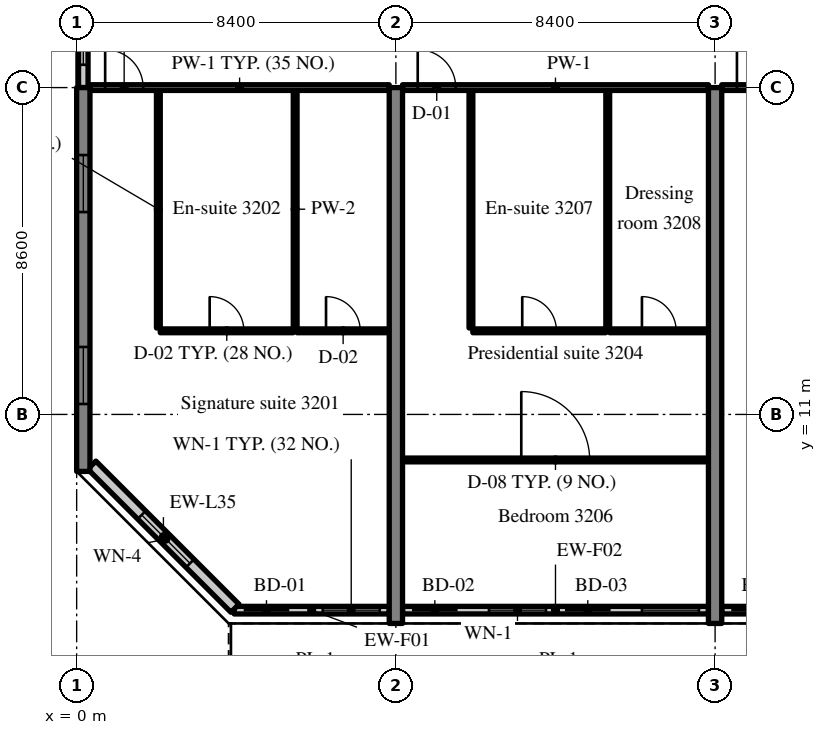
"""IFC4 building model, lengths in metres.
Left out: names, types, materials, properties, quantities, classifications, styles, units other than length and angle.
Written with IfcOpenShell. Run it as: python <this file> out.ifc"""

import sys

from ifc_helpers import new_model, si_unit, direction, frame, frame_2d, origin, place, context, subcontext, project, spatial, rectangle, extrude, source, transform, mapped, element, fill, save


model = new_model("IFC4")
c1 = context("Model", 3, precision=1e-05, world=origin(), true_north=direction((0.0, 1.0)))
c2 = subcontext(c1, "Body", "Model", "MODEL_VIEW")
j1 = project(units=[si_unit("LENGTHUNIT", "METRE"), si_unit("PLANEANGLEUNIT", "RADIAN")], contexts=[c1])
p1 = place(None, origin())
s1 = spatial("IfcSite", under=j1, at=p1, CompositionType="ELEMENT")
p2 = place(p1, origin())
s2 = spatial("IfcBuilding", under=s1, at=p2, CompositionType="ELEMENT")
p3 = place(p2, frame((0.0, 0.0, 133.2)))
s3 = spatial("IfcBuildingStorey", under=s2, at=p3, CompositionType="ELEMENT", Elevation=133.2)
m1 = source(origin(), c2, "Body", "SweptSolid", [
    extrude(rectangle(XDim=10.1, YDim=0.35, at=frame_2d((5.05, 0.0))), origin(), (0.0, 0.0, 1.0), 3.52),
])
p4 = place(p3, frame((0.175, 9.5, 0.0), z_axis=(0.0, 0.0, 1.0), x_axis=(0.0, 1.0, 0.0)))
e1 = element("IfcWall", 1, at=p4, inside=s3, PredefinedType="SHEAR", context=c2, shape_type="MappedRepresentation", body=[
    mapped(m1, transform((0.0, 0.0, 0.0), scale=1.0)),
])
m2 = source(origin(), c2, "Body", "SweptSolid", [
    extrude(rectangle(XDim=1.5, YDim=1.5, at=frame_2d((0.75, 0.75))), frame((0.0, 0.185, 0.0), z_axis=(0.0, -1.0, 0.0), x_axis=(1.0, 0.0, 0.0)), (0.0, 0.0, 1.0), 0.37),
])
p5 = place(p4, frame((1.775, 0.0, 0.9)))
e2 = element("IfcOpeningElement", 2, at=p5, cuts=e1, PredefinedType="OPENING", context=c2, shape_type="MappedRepresentation", body=[
    mapped(m2, transform((0.0, 0.0, 0.0), scale=1.0)),
])
p6 = place(p4, frame((6.825, 0.0, 0.9)))
e3 = element("IfcOpeningElement", 3, at=p6, cuts=e1, PredefinedType="OPENING", context=c2, shape_type="MappedRepresentation", body=[
    mapped(m2, transform((0.0, 0.0, 0.0), scale=1.0)),
])
m3 = source(origin(), c2, "Body", "SweptSolid", [
    extrude(rectangle(XDim=14.1, YDim=0.35, at=frame_2d((7.05, 0.0))), origin(), (0.0, 0.0, 1.0), 3.52),
])
for number, where, z_axis, x_axis in (
    (4, (8.4, 5.5, 0.0), (0.0, 0.0, 1.0), (0.0, 1.0, 0.0)),
    (5, (16.8, 5.5, 0.0), (0.0, 0.0, 1.0), (0.0, 1.0, 0.0)),
):
    element("IfcWall", number, at=place(p3, frame(where, z_axis=z_axis, x_axis=x_axis)), inside=s3, PredefinedType="SHEAR", context=c2, shape_type="MappedRepresentation", body=[
        mapped(m3, transform((0.0, 0.0, 0.0), scale=1.0)),
    ])
m4 = source(origin(), c2, "Body", "SweptSolid", [
    extrude(rectangle(XDim=4.08, YDim=0.2, at=frame_2d((2.04, 0.0))), origin(), (0.0, 0.0, 1.0), 2.82),
])
p7 = place(p3, frame((4.145, 5.85, 0.0), z_axis=(0.0, 0.0, 1.0), x_axis=(1.0, 0.0, 0.0)))
e6 = element("IfcWall", 6, at=p7, inside=s3, PredefinedType="SOLIDWALL", context=c2, shape_type="MappedRepresentation", body=[
    mapped(m4, transform((0.0, 0.0, 0.0), scale=1.0)),
])
m5 = source(origin(), c2, "Body", "SweptSolid", [
    extrude(rectangle(XDim=1.2, YDim=2.4, at=frame_2d((0.6, 1.2))), frame((0.0, 0.11, 0.0), z_axis=(0.0, -1.0, 0.0), x_axis=(1.0, 0.0, 0.0)), (0.0, 0.0, 1.0), 0.22),
])
p8 = place(p7, frame((0.25, 0.0, 0.0)))
e7 = element("IfcOpeningElement", 7, at=p8, cuts=e6, PredefinedType="OPENING", context=c2, shape_type="MappedRepresentation", body=[
    mapped(m5, transform((0.0, 0.0, 0.0), scale=1.0)),
])
m6 = source(origin(), c2, "Body", "SweptSolid", [
    extrude(rectangle(XDim=1.5, YDim=1.5, at=frame_2d((0.75, 0.75))), frame((0.0, 0.11, 0.0), z_axis=(0.0, -1.0, 0.0), x_axis=(1.0, 0.0, 0.0)), (0.0, 0.0, 1.0), 0.22),
])
p9 = place(p7, frame((2.33, 0.0, 0.9)))
e8 = element("IfcOpeningElement", 8, at=p9, cuts=e6, PredefinedType="OPENING", context=c2, shape_type="MappedRepresentation", body=[
    mapped(m6, transform((0.0, 0.0, 0.0), scale=1.0)),
])
m7 = source(origin(), c2, "Body", "SweptSolid", [
    extrude(rectangle(XDim=8.05, YDim=0.2, at=frame_2d((4.025, 0.0))), origin(), (0.0, 0.0, 1.0), 2.82),
])
p10 = place(p3, frame((8.575, 5.85, 0.0), z_axis=(0.0, 0.0, 1.0), x_axis=(1.0, 0.0, 0.0)))
e9 = element("IfcWall", 9, at=p10, inside=s3, PredefinedType="SOLIDWALL", context=c2, shape_type="MappedRepresentation", body=[
    mapped(m7, transform((0.0, 0.0, 0.0), scale=1.0)),
])
p11 = place(p10, frame((0.25, 0.0, 0.0)))
e10 = element("IfcOpeningElement", 10, at=p11, cuts=e9, PredefinedType="OPENING", context=c2, shape_type="MappedRepresentation", body=[
    mapped(m5, transform((0.0, 0.0, 0.0), scale=1.0)),
])
p12 = place(p10, frame((2.275, 0.0, 0.9)))
e11 = element("IfcOpeningElement", 11, at=p12, cuts=e9, PredefinedType="OPENING", context=c2, shape_type="MappedRepresentation", body=[
    mapped(m6, transform((0.0, 0.0, 0.0), scale=1.0)),
])
p13 = place(p10, frame((4.275, 0.0, 0.0)))
e12 = element("IfcOpeningElement", 12, at=p13, cuts=e9, PredefinedType="OPENING", context=c2, shape_type="MappedRepresentation", body=[
    mapped(m5, transform((0.0, 0.0, 0.0), scale=1.0)),
])
p14 = place(p10, frame((6.3, 0.0, 0.9)))
e13 = element("IfcOpeningElement", 13, at=p14, cuts=e9, PredefinedType="OPENING", context=c2, shape_type="MappedRepresentation", body=[
    mapped(m6, transform((0.0, 0.0, 0.0), scale=1.0)),
])
m8 = source(origin(), c2, "Body", "SweptSolid", [
    extrude(rectangle(XDim=8.05, YDim=0.2, at=frame_2d((4.025, 0.0))), origin(), (0.0, 0.0, 1.0), 2.82),
])
p15 = place(p3, frame((16.975, 5.85, 0.0), z_axis=(0.0, 0.0, 1.0), x_axis=(1.0, 0.0, 0.0)))
e14 = element("IfcWall", 14, at=p15, inside=s3, PredefinedType="SOLIDWALL", context=c2, shape_type="MappedRepresentation", body=[
    mapped(m8, transform((0.0, 0.0, 0.0), scale=1.0)),
])
p16 = place(p15, frame((0.25, 0.0, 0.0)))
e15 = element("IfcOpeningElement", 15, at=p16, cuts=e14, PredefinedType="OPENING", context=c2, shape_type="MappedRepresentation", body=[
    mapped(m5, transform((0.0, 0.0, 0.0), scale=1.0)),
])
p17 = place(p15, frame((2.275, 0.0, 0.9)))
e16 = element("IfcOpeningElement", 16, at=p17, cuts=e14, PredefinedType="OPENING", context=c2, shape_type="MappedRepresentation", body=[
    mapped(m6, transform((0.0, 0.0, 0.0), scale=1.0)),
])
p18 = place(p15, frame((4.275, 0.0, 0.0)))
e17 = element("IfcOpeningElement", 17, at=p18, cuts=e14, PredefinedType="OPENING", context=c2, shape_type="MappedRepresentation", body=[
    mapped(m5, transform((0.0, 0.0, 0.0), scale=1.0)),
])
p19 = place(p15, frame((6.3, 0.0, 0.9)))
e18 = element("IfcOpeningElement", 18, at=p19, cuts=e14, PredefinedType="OPENING", context=c2, shape_type="MappedRepresentation", body=[
    mapped(m6, transform((0.0, 0.0, 0.0), scale=1.0)),
])
m9 = source(origin(), c2, "Body", "SweptSolid", [
    extrude(rectangle(XDim=5.326, YDim=0.3, at=frame_2d((2.663, 0.0))), origin(), (0.0, 0.0, 1.0), 3.52),
])
p20 = place(p3, frame((0.4, 9.666, 0.0), z_axis=(0.0, 0.0, 1.0), x_axis=(0.707106781187, -0.707106781187, 0.0)))
e19 = element("IfcWall", 19, at=p20, inside=s3, PredefinedType="SOLIDWALL", context=c2, shape_type="MappedRepresentation", body=[
    mapped(m9, transform((0.0, 0.0, 0.0), scale=1.0)),
])
m10 = source(origin(), c2, "Body", "SweptSolid", [
    extrude(rectangle(XDim=1.8, YDim=1.5, at=frame_2d((0.9, 0.75))), frame((0.0, 0.16, 0.0), z_axis=(0.0, -1.0, 0.0), x_axis=(1.0, 0.0, 0.0)), (0.0, 0.0, 1.0), 0.32),
])
p21 = place(p20, frame((1.854, 0.0, 0.9)))
e20 = element("IfcOpeningElement", 20, at=p21, cuts=e19, PredefinedType="OPENING", context=c2, shape_type="MappedRepresentation", body=[
    mapped(m10, transform((0.0, 0.0, 0.0), scale=1.0)),
])
m11 = source(origin(), c2, "Body", "SweptSolid", [
    extrude(rectangle(XDim=2.4, YDim=0.25, at=frame_2d((1.2, 0.0))), origin(), (0.0, 0.0, 1.0), 2.62),
])
p22 = place(p3, frame((0.175, 19.6, 0.0), z_axis=(0.0, 0.0, 1.0), x_axis=(0.0, 1.0, 0.0)))
e21 = element("IfcWall", 21, at=p22, inside=s3, PredefinedType="SOLIDWALL", context=c2, shape_type="MappedRepresentation", body=[
    mapped(m11, transform((0.0, 0.0, 0.0), scale=1.0)),
])
m12 = source(origin(), c2, "Body", "SweptSolid", [
    extrude(rectangle(XDim=1.2, YDim=1.5, at=frame_2d((0.6, 0.75))), frame((0.0, 0.135, 0.0), z_axis=(0.0, -1.0, 0.0), x_axis=(1.0, 0.0, 0.0)), (0.0, 0.0, 1.0), 0.27),
])
p23 = place(p22, frame((0.6, 0.0, 0.9)))
e22 = element("IfcOpeningElement", 22, at=p23, cuts=e21, PredefinedType="OPENING", context=c2, shape_type="MappedRepresentation", body=[
    mapped(m12, transform((0.0, 0.0, 0.0), scale=1.0)),
])
m13 = source(origin(), c2, "Body", "SweptSolid", [
    extrude(rectangle(XDim=6.25, YDim=0.1, at=frame_2d((3.125, 0.0))), origin(), (0.0, 0.0, 1.0), 3.52),
])
for number, where, z_axis, x_axis in (
    (23, (2.15, 13.275, 0.0), (0.0, 0.0, 1.0), (0.0, 1.0, 0.0)),
    (24, (5.75, 13.275, 0.0), (0.0, 0.0, 1.0), (0.0, 1.0, 0.0)),
):
    element("IfcWall", number, at=place(p3, frame(where, z_axis=z_axis, x_axis=x_axis)), inside=s3, PredefinedType="PARTITIONING", context=c2, shape_type="MappedRepresentation", body=[
        mapped(m13, transform((0.0, 0.0, 0.0), scale=1.0)),
    ])
m14 = source(origin(), c2, "Body", "SweptSolid", [
    extrude(rectangle(XDim=3.5, YDim=0.1, at=frame_2d((1.75, 0.0))), origin(), (0.0, 0.0, 1.0), 3.52),
])
p24 = place(p3, frame((2.2, 13.2, 0.0), z_axis=(0.0, 0.0, 1.0), x_axis=(1.0, 0.0, 0.0)))
e25 = element("IfcWall", 25, at=p24, inside=s3, PredefinedType="PARTITIONING", context=c2, shape_type="MappedRepresentation", body=[
    mapped(m14, transform((0.0, 0.0, 0.0), scale=1.0)),
])
m15 = source(origin(), c2, "Body", "SweptSolid", [
    extrude(rectangle(XDim=0.9, YDim=2.1, at=frame_2d((0.45, 1.05))), frame((0.0, 0.06, 0.0), z_axis=(0.0, -1.0, 0.0), x_axis=(1.0, 0.0, 0.0)), (0.0, 0.0, 1.0), 0.12),
])
p25 = place(p24, frame((1.3, 0.0, 0.0)))
e26 = element("IfcOpeningElement", 26, at=p25, cuts=e25, PredefinedType="OPENING", context=c2, shape_type="MappedRepresentation", body=[
    mapped(m15, transform((0.0, 0.0, 0.0), scale=1.0)),
])
m16 = source(origin(), c2, "Body", "SweptSolid", [
    extrude(rectangle(XDim=2.425, YDim=0.1, at=frame_2d((1.212, 0.0))), origin(), (0.0, 0.0, 1.0), 3.52),
])
p26 = place(p3, frame((5.8, 13.2, 0.0), z_axis=(0.0, 0.0, 1.0), x_axis=(1.0, 0.0, 0.0)))
e27 = element("IfcWall", 27, at=p26, inside=s3, PredefinedType="PARTITIONING", context=c2, shape_type="MappedRepresentation", body=[
    mapped(m16, transform((0.0, 0.0, 0.0), scale=1.0)),
])
p27 = place(p26, frame((0.762, 0.0, 0.0)))
e28 = element("IfcOpeningElement", 28, at=p27, cuts=e27, PredefinedType="OPENING", context=c2, shape_type="MappedRepresentation", body=[
    mapped(m15, transform((0.0, 0.0, 0.0), scale=1.0)),
])
m17 = source(origin(), c2, "Body", "SweptSolid", [
    extrude(rectangle(XDim=7.875, YDim=0.15, at=frame_2d((3.938, 0.0))), origin(), (0.0, 0.0, 1.0), 2.82),
])
p28 = place(p3, frame((0.35, 19.6, 0.0), z_axis=(0.0, 0.0, 1.0), x_axis=(1.0, 0.0, 0.0)))
e29 = element("IfcWall", 29, at=p28, inside=s3, PredefinedType="PARTITIONING", context=c2, shape_type="MappedRepresentation", body=[
    mapped(m17, transform((0.0, 0.0, 0.0), scale=1.0)),
])
m18 = source(origin(), c2, "Body", "SweptSolid", [
    extrude(rectangle(XDim=1.0, YDim=2.1, at=frame_2d((0.5, 1.05))), frame((0.0, 0.085, 0.0), z_axis=(0.0, -1.0, 0.0), x_axis=(1.0, 0.0, 0.0)), (0.0, 0.0, 1.0), 0.17),
])
p29 = place(p28, frame((0.4, 0.0, 0.0)))
e30 = element("IfcOpeningElement", 30, at=p29, cuts=e29, PredefinedType="OPENING", context=c2, shape_type="MappedRepresentation", body=[
    mapped(m18, transform((0.0, 0.0, 0.0), scale=1.0)),
])
for number, where, z_axis, x_axis in (
    (31, (10.375, 13.275, 0.0), (0.0, 0.0, 1.0), (0.0, 1.0, 0.0)),
    (32, (13.975, 13.275, 0.0), (0.0, 0.0, 1.0), (0.0, 1.0, 0.0)),
):
    element("IfcWall", number, at=place(p3, frame(where, z_axis=z_axis, x_axis=x_axis)), inside=s3, PredefinedType="PARTITIONING", context=c2, shape_type="MappedRepresentation", body=[
        mapped(m13, transform((0.0, 0.0, 0.0), scale=1.0)),
    ])
p30 = place(p3, frame((10.425, 13.2, 0.0), z_axis=(0.0, 0.0, 1.0), x_axis=(1.0, 0.0, 0.0)))
e33 = element("IfcWall", 33, at=p30, inside=s3, PredefinedType="PARTITIONING", context=c2, shape_type="MappedRepresentation", body=[
    mapped(m14, transform((0.0, 0.0, 0.0), scale=1.0)),
])
p31 = place(p30, frame((1.3, 0.0, 0.0)))
e34 = element("IfcOpeningElement", 34, at=p31, cuts=e33, PredefinedType="OPENING", context=c2, shape_type="MappedRepresentation", body=[
    mapped(m15, transform((0.0, 0.0, 0.0), scale=1.0)),
])
m19 = source(origin(), c2, "Body", "SweptSolid", [
    extrude(rectangle(XDim=2.6, YDim=0.1, at=frame_2d((1.3, 0.0))), origin(), (0.0, 0.0, 1.0), 3.52),
])
p32 = place(p3, frame((14.025, 13.2, 0.0), z_axis=(0.0, 0.0, 1.0), x_axis=(1.0, 0.0, 0.0)))
e35 = element("IfcWall", 35, at=p32, inside=s3, PredefinedType="PARTITIONING", context=c2, shape_type="MappedRepresentation", body=[
    mapped(m19, transform((0.0, 0.0, 0.0), scale=1.0)),
])
p33 = place(p32, frame((0.85, 0.0, 0.0)))
e36 = element("IfcOpeningElement", 36, at=p33, cuts=e35, PredefinedType="OPENING", context=c2, shape_type="MappedRepresentation", body=[
    mapped(m15, transform((0.0, 0.0, 0.0), scale=1.0)),
])
m20 = source(origin(), c2, "Body", "SweptSolid", [
    extrude(rectangle(XDim=8.05, YDim=0.1, at=frame_2d((4.025, 0.0))), origin(), (0.0, 0.0, 1.0), 3.52),
])
p34 = place(p3, frame((8.575, 9.802, 0.0), z_axis=(0.0, 0.0, 1.0), x_axis=(1.0, 0.0, 0.0)))
e37 = element("IfcWall", 37, at=p34, inside=s3, PredefinedType="PARTITIONING", context=c2, shape_type="MappedRepresentation", body=[
    mapped(m20, transform((0.0, 0.0, 0.0), scale=1.0)),
])
m21 = source(origin(), c2, "Body", "SweptSolid", [
    extrude(rectangle(XDim=1.8, YDim=2.1, at=frame_2d((0.9, 1.05))), frame((0.0, 0.06, 0.0), z_axis=(0.0, -1.0, 0.0), x_axis=(1.0, 0.0, 0.0)), (0.0, 0.0, 1.0), 0.12),
])
p35 = place(p34, frame((3.125, 0.0, 0.0)))
e38 = element("IfcOpeningElement", 38, at=p35, cuts=e37, PredefinedType="OPENING", context=c2, shape_type="MappedRepresentation", body=[
    mapped(m21, transform((0.0, 0.0, 0.0), scale=1.0)),
])
m22 = source(origin(), c2, "Body", "SweptSolid", [
    extrude(rectangle(XDim=8.05, YDim=0.15, at=frame_2d((4.025, 0.0))), origin(), (0.0, 0.0, 1.0), 2.82),
])
p36 = place(p3, frame((8.575, 19.6, 0.0), z_axis=(0.0, 0.0, 1.0), x_axis=(1.0, 0.0, 0.0)))
e39 = element("IfcWall", 39, at=p36, inside=s3, PredefinedType="PARTITIONING", context=c2, shape_type="MappedRepresentation", body=[
    mapped(m22, transform((0.0, 0.0, 0.0), scale=1.0)),
])
p37 = place(p36, frame((0.4, 0.0, 0.0)))
e40 = element("IfcOpeningElement", 40, at=p37, cuts=e39, PredefinedType="OPENING", context=c2, shape_type="MappedRepresentation", body=[
    mapped(m18, transform((0.0, 0.0, 0.0), scale=1.0)),
])
m23 = source(origin(), c2, "Body", "SweptSolid", [
    extrude(rectangle(XDim=8.05, YDim=0.15, at=frame_2d((4.025, 0.0))), origin(), (0.0, 0.0, 1.0), 2.82),
])
p38 = place(p3, frame((16.975, 19.6, 0.0), z_axis=(0.0, 0.0, 1.0), x_axis=(1.0, 0.0, 0.0)))
e41 = element("IfcWall", 41, at=p38, inside=s3, PredefinedType="PARTITIONING", context=c2, shape_type="MappedRepresentation", body=[
    mapped(m23, transform((0.0, 0.0, 0.0), scale=1.0)),
])
p39 = place(p38, frame((0.4, 0.0, 0.0)))
e42 = element("IfcOpeningElement", 42, at=p39, cuts=e41, PredefinedType="OPENING", context=c2, shape_type="MappedRepresentation", body=[
    mapped(m18, transform((0.0, 0.0, 0.0), scale=1.0)),
])
m24 = source(origin(), c2, "Body", "SweptSolid", [
    extrude(rectangle(XDim=1.2, YDim=2.4, at=frame_2d((0.6, 1.2))), frame((0.0, 0.025, 0.0), z_axis=(0.0, -1.0, 0.0), x_axis=(1.0, 0.0, 0.0)), (0.0, 0.0, 1.0), 0.05),
])
p40 = place(p8, origin())
e43 = element("IfcDoor", 43, at=p40, inside=s3, OperationType="SLIDING_TO_LEFT", PredefinedType="DOOR", context=c2, shape_type="MappedRepresentation", body=[
    mapped(m24, transform((0.0, 0.0, 0.0), scale=1.0)),
])
fill(e7, e43)
m25 = source(origin(), c2, "Body", "SweptSolid", [
    extrude(rectangle(XDim=1.5, YDim=1.5, at=frame_2d((0.75, 0.75))), frame((0.0, 0.03, 0.0), z_axis=(0.0, -1.0, 0.0), x_axis=(1.0, 0.0, 0.0)), (0.0, 0.0, 1.0), 0.06),
])
p41 = place(p9, origin())
e44 = element("IfcWindow", 44, at=p41, inside=s3, PartitioningType="SINGLE_PANEL", PredefinedType="WINDOW", context=c2, shape_type="MappedRepresentation", body=[
    mapped(m25, transform((0.0, 0.0, 0.0), scale=1.0)),
])
fill(e8, e44)
p42 = place(p11, origin())
e45 = element("IfcDoor", 45, at=p42, inside=s3, OperationType="SLIDING_TO_RIGHT", PredefinedType="DOOR", context=c2, shape_type="MappedRepresentation", body=[
    mapped(m24, transform((0.0, 0.0, 0.0), scale=1.0)),
])
fill(e10, e45)
p43 = place(p12, origin())
e46 = element("IfcWindow", 46, at=p43, inside=s3, PartitioningType="SINGLE_PANEL", PredefinedType="WINDOW", context=c2, shape_type="MappedRepresentation", body=[
    mapped(m25, transform((0.0, 0.0, 0.0), scale=1.0)),
])
fill(e11, e46)
p44 = place(p13, origin())
e47 = element("IfcDoor", 47, at=p44, inside=s3, OperationType="SLIDING_TO_LEFT", PredefinedType="DOOR", context=c2, shape_type="MappedRepresentation", body=[
    mapped(m24, transform((0.0, 0.0, 0.0), scale=1.0)),
])
fill(e12, e47)
p45 = place(p14, origin())
e48 = element("IfcWindow", 48, at=p45, inside=s3, PartitioningType="SINGLE_PANEL", PredefinedType="WINDOW", context=c2, shape_type="MappedRepresentation", body=[
    mapped(m25, transform((0.0, 0.0, 0.0), scale=1.0)),
])
fill(e13, e48)
p46 = place(p16, origin())
e49 = element("IfcDoor", 49, at=p46, inside=s3, OperationType="SLIDING_TO_RIGHT", PredefinedType="DOOR", context=c2, shape_type="MappedRepresentation", body=[
    mapped(m24, transform((0.0, 0.0, 0.0), scale=1.0)),
])
fill(e15, e49)
m26 = source(origin(), c2, "Body", "SweptSolid", [
    extrude(rectangle(XDim=1.8, YDim=1.5, at=frame_2d((0.9, 0.75))), frame((0.0, 0.03, 0.0), z_axis=(0.0, -1.0, 0.0), x_axis=(1.0, 0.0, 0.0)), (0.0, 0.0, 1.0), 0.06),
])
p47 = place(p21, origin())
e50 = element("IfcWindow", 50, at=p47, inside=s3, PartitioningType="SINGLE_PANEL", PredefinedType="WINDOW", context=c2, shape_type="MappedRepresentation", body=[
    mapped(m26, transform((0.0, 0.0, 0.0), scale=1.0)),
])
fill(e20, e50)
p48 = place(p5, origin())
e51 = element("IfcWindow", 51, at=p48, inside=s3, PartitioningType="SINGLE_PANEL", PredefinedType="WINDOW", context=c2, shape_type="MappedRepresentation", body=[
    mapped(m25, transform((0.0, 0.0, 0.0), scale=1.0)),
])
fill(e2, e51)
p49 = place(p6, origin())
e52 = element("IfcWindow", 52, at=p49, inside=s3, PartitioningType="SINGLE_PANEL", PredefinedType="WINDOW", context=c2, shape_type="MappedRepresentation", body=[
    mapped(m25, transform((0.0, 0.0, 0.0), scale=1.0)),
])
fill(e3, e52)
m27 = source(origin(), c2, "Body", "SweptSolid", [
    extrude(rectangle(XDim=1.2, YDim=1.5, at=frame_2d((0.6, 0.75))), frame((0.0, 0.03, 0.0), z_axis=(0.0, -1.0, 0.0), x_axis=(1.0, 0.0, 0.0)), (0.0, 0.0, 1.0), 0.06),
])
p50 = place(p23, origin())
e53 = element("IfcWindow", 53, at=p50, inside=s3, PartitioningType="SINGLE_PANEL", PredefinedType="WINDOW", context=c2, shape_type="MappedRepresentation", body=[
    mapped(m27, transform((0.0, 0.0, 0.0), scale=1.0)),
])
fill(e22, e53)
m28 = source(origin(), c2, "Body", "SweptSolid", [
    extrude(rectangle(XDim=0.9, YDim=2.1, at=frame_2d((0.45, 1.05))), frame((0.0, 0.025, 0.0), z_axis=(0.0, -1.0, 0.0), x_axis=(1.0, 0.0, 0.0)), (0.0, 0.0, 1.0), 0.05),
])
p51 = place(p25, origin())
e54 = element("IfcDoor", 54, at=p51, inside=s3, OperationType="SINGLE_SWING_LEFT", PredefinedType="DOOR", context=c2, shape_type="MappedRepresentation", body=[
    mapped(m28, transform((0.0, 0.0, 0.0), scale=1.0)),
])
fill(e26, e54)
p52 = place(p27, origin())
e55 = element("IfcDoor", 55, at=p52, inside=s3, OperationType="SINGLE_SWING_LEFT", PredefinedType="DOOR", context=c2, shape_type="MappedRepresentation", body=[
    mapped(m28, transform((0.0, 0.0, 0.0), scale=1.0)),
])
fill(e28, e55)
m29 = source(origin(), c2, "Body", "SweptSolid", [
    extrude(rectangle(XDim=1.0, YDim=2.1, at=frame_2d((0.5, 1.05))), frame((0.0, 0.025, 0.0), z_axis=(0.0, -1.0, 0.0), x_axis=(1.0, 0.0, 0.0)), (0.0, 0.0, 1.0), 0.05),
])
p53 = place(p29, origin())
e56 = element("IfcDoor", 56, at=p53, inside=s3, OperationType="SINGLE_SWING_LEFT", PredefinedType="DOOR", context=c2, shape_type="MappedRepresentation", body=[
    mapped(m29, transform((0.0, 0.0, 0.0), scale=1.0)),
])
fill(e30, e56)
p54 = place(p31, origin())
e57 = element("IfcDoor", 57, at=p54, inside=s3, OperationType="SINGLE_SWING_LEFT", PredefinedType="DOOR", context=c2, shape_type="MappedRepresentation", body=[
    mapped(m28, transform((0.0, 0.0, 0.0), scale=1.0)),
])
fill(e34, e57)
p55 = place(p33, origin())
e58 = element("IfcDoor", 58, at=p55, inside=s3, OperationType="SINGLE_SWING_LEFT", PredefinedType="DOOR", context=c2, shape_type="MappedRepresentation", body=[
    mapped(m28, transform((0.0, 0.0, 0.0), scale=1.0)),
])
fill(e36, e58)
m30 = source(origin(), c2, "Body", "SweptSolid", [
    extrude(rectangle(XDim=1.8, YDim=2.1, at=frame_2d((0.9, 1.05))), frame((0.0, 0.025, 0.0), z_axis=(0.0, -1.0, 0.0), x_axis=(1.0, 0.0, 0.0)), (0.0, 0.0, 1.0), 0.05),
])
p56 = place(p35, origin())
e59 = element("IfcDoor", 59, at=p56, inside=s3, OperationType="DOUBLE_DOOR_SINGLE_SWING", PredefinedType="DOOR", context=c2, shape_type="MappedRepresentation", body=[
    mapped(m30, transform((0.0, 0.0, 0.0), scale=1.0)),
])
fill(e38, e59)
p57 = place(p37, origin())
e60 = element("IfcDoor", 60, at=p57, inside=s3, OperationType="SINGLE_SWING_LEFT", PredefinedType="DOOR", context=c2, shape_type="MappedRepresentation", body=[
    mapped(m29, transform((0.0, 0.0, 0.0), scale=1.0)),
])
fill(e40, e60)
p58 = place(p39, origin())
e61 = element("IfcDoor", 61, at=p58, inside=s3, OperationType="SINGLE_SWING_LEFT", PredefinedType="DOOR", context=c2, shape_type="MappedRepresentation", body=[
    mapped(m29, transform((0.0, 0.0, 0.0), scale=1.0)),
])
fill(e42, e61)
save(model, sys.argv[1])
